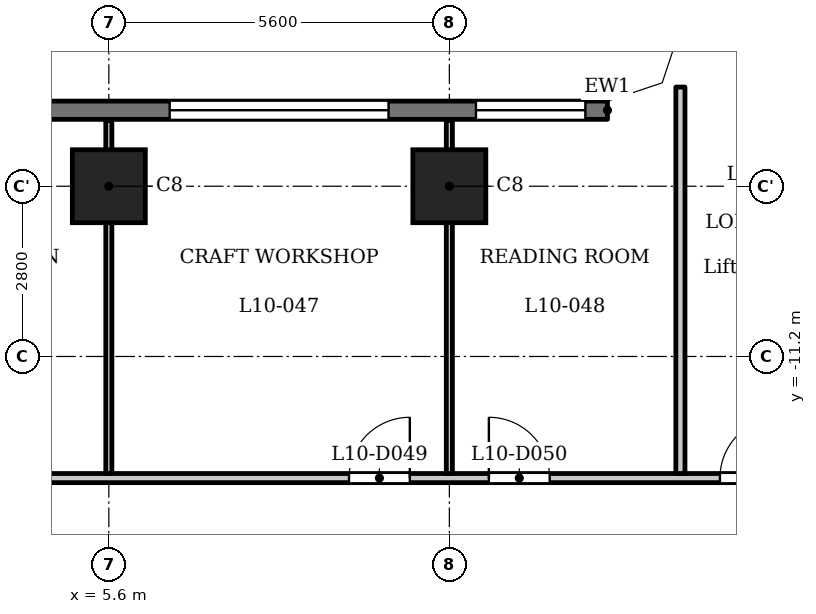
"""IFC4 building model, lengths in metres.
Left out: names, types, materials, properties, quantities, classifications, styles, units other than length and angle.
Written with IfcOpenShell. Run it as: python <this file> out.ifc"""

import sys

from ifc_helpers import new_model, si_unit, direction, frame, frame_2d, origin, origin_2d, place, context, subcontext, project, spatial, polyline, rectangle, outline, extrude, element, fill, save


model = new_model("IFC4")
c1 = context("Model", 3, precision=1e-05, world=origin(), true_north=direction((0.0, 1.0)))
c2 = subcontext(c1, "Body", "Model", "MODEL_VIEW")
j1 = project(units=[si_unit("LENGTHUNIT", "METRE"), si_unit("PLANEANGLEUNIT", "RADIAN")], contexts=[c1])
p1 = place(None, origin())
s1 = spatial("IfcSite", under=j1, at=p1, CompositionType="ELEMENT")
p2 = place(p1, origin())
s2 = spatial("IfcBuilding", under=s1, at=p2, CompositionType="ELEMENT")
p3 = place(p2, frame((0.0, 0.0, 44.5)))
s3 = spatial("IfcBuildingStorey", under=s2, at=p3, CompositionType="ELEMENT", Elevation=44.5)
for number, where, z_axis, x_axis in (
    (1, (5.6, -8.4, 0.0), (0.0, 0.0, 1.0), (1.0, 0.0, 0.0)),
    (2, (11.2, -8.4, 0.0), (0.0, 0.0, 1.0), (1.0, 0.0, 0.0)),
):
    element("IfcColumn", number, at=place(p3, frame(where, z_axis=z_axis, x_axis=x_axis)), inside=s3, PredefinedType="COLUMN", context=c2, shape_type="SweptSolid", body=[
        extrude(rectangle(XDim=1.2, YDim=1.2, at=origin_2d()), origin(), (0.0, 0.0, 1.0), 3.5),
    ])
p4 = place(p3, frame((13.8, -7.15, 0.0), z_axis=(0.0, 0.0, 1.0), x_axis=(-1.0, 0.0, 0.0)))
e3 = element("IfcWall", 3, at=p4, inside=s3, PredefinedType="SOLIDWALL", context=c2, shape_type="SweptSolid", body=[
    extrude(rectangle(XDim=27.6, YDim=0.3, at=frame_2d((13.8, 0.0))), origin(), (0.0, 0.0, 1.0), 3.2),
])
p5 = place(p4, frame((0.363, 0.0, 0.9)))
e4 = element("IfcOpeningElement", 4, at=p5, cuts=e3, PredefinedType="OPENING", context=c2, shape_type="SweptSolid", body=[
    extrude(rectangle(XDim=1.8, YDim=1.25, at=frame_2d((0.9, 0.625))), frame((0.0, 0.16, 0.0), z_axis=(0.0, -1.0, 0.0), x_axis=(1.0, 0.0, 0.0)), (0.0, 0.0, 1.0), 0.32),
])
p6 = place(p4, frame((3.6, 0.0, 1.2)))
e5 = element("IfcOpeningElement", 5, at=p6, cuts=e3, PredefinedType="OPENING", context=c2, shape_type="SweptSolid", body=[
    extrude(rectangle(XDim=3.6, YDim=0.95, at=frame_2d((1.8, 0.475))), frame((0.0, 0.16, 0.0), z_axis=(0.0, -1.0, 0.0), x_axis=(1.0, 0.0, 0.0)), (0.0, 0.0, 1.0), 0.32),
])
p7 = place(p4, frame((9.2, 0.0, 1.2)))
e6 = element("IfcOpeningElement", 6, at=p7, cuts=e3, PredefinedType="OPENING", context=c2, shape_type="SweptSolid", body=[
    extrude(rectangle(XDim=3.6, YDim=0.95, at=frame_2d((1.8, 0.475))), frame((0.0, 0.16, 0.0), z_axis=(0.0, -1.0, 0.0), x_axis=(1.0, 0.0, 0.0)), (0.0, 0.0, 1.0), 0.32),
])
p8 = place(p4, frame((14.8, 0.0, 1.2)))
e7 = element("IfcOpeningElement", 7, at=p8, cuts=e3, PredefinedType="OPENING", context=c2, shape_type="SweptSolid", body=[
    extrude(rectangle(XDim=3.6, YDim=0.95, at=frame_2d((1.8, 0.475))), frame((0.0, 0.16, 0.0), z_axis=(0.0, -1.0, 0.0), x_axis=(1.0, 0.0, 0.0)), (0.0, 0.0, 1.0), 0.32),
])
p9 = place(p4, frame((20.4, 0.0, 1.2)))
e8 = element("IfcOpeningElement", 8, at=p9, cuts=e3, PredefinedType="OPENING", context=c2, shape_type="SweptSolid", body=[
    extrude(rectangle(XDim=3.6, YDim=0.95, at=frame_2d((1.8, 0.475))), frame((0.0, 0.16, 0.0), z_axis=(0.0, -1.0, 0.0), x_axis=(1.0, 0.0, 0.0)), (0.0, 0.0, 1.0), 0.32),
])
p10 = place(p4, frame((25.438, 0.0, 0.9)))
e9 = element("IfcOpeningElement", 9, at=p10, cuts=e3, PredefinedType="OPENING", context=c2, shape_type="SweptSolid", body=[
    extrude(rectangle(XDim=1.8, YDim=1.25, at=frame_2d((0.9, 0.625))), frame((0.0, 0.16, 0.0), z_axis=(0.0, -1.0, 0.0), x_axis=(1.0, 0.0, 0.0)), (0.0, 0.0, 1.0), 0.32),
])
p11 = place(p3, frame((-17.4, -13.2, 0.0), z_axis=(0.0, 0.0, 1.0), x_axis=(1.0, 0.0, 0.0)))
e10 = element("IfcWall", 10, at=p11, inside=s3, PredefinedType="PARTITIONING", context=c2, shape_type="SweptSolid", body=[
    extrude(rectangle(XDim=34.8, YDim=0.15, at=frame_2d((17.4, 0.0))), origin(), (0.0, 0.0, 1.0), 3.2),
])
p12 = place(p11, frame((0.65, 0.0, 0.0)))
e11 = element("IfcOpeningElement", 11, at=p12, cuts=e10, PredefinedType="OPENING", context=c2, shape_type="SweptSolid", body=[
    extrude(rectangle(XDim=1.0, YDim=2.1, at=frame_2d((0.5, 1.05))), frame((0.0, 0.085, 0.0), z_axis=(0.0, -1.0, 0.0), x_axis=(1.0, 0.0, 0.0)), (0.0, 0.0, 1.0), 0.17),
])
p13 = place(p11, frame((33.05, 0.0, 0.0)))
e12 = element("IfcOpeningElement", 12, at=p13, cuts=e10, PredefinedType="OPENING", context=c2, shape_type="SweptSolid", body=[
    extrude(rectangle(XDim=1.0, YDim=2.1, at=frame_2d((0.5, 1.05))), frame((0.0, 0.085, 0.0), z_axis=(0.0, -1.0, 0.0), x_axis=(1.0, 0.0, 0.0)), (0.0, 0.0, 1.0), 0.17),
])
p14 = place(p11, frame((4.55, 0.0, 0.0)))
e13 = element("IfcOpeningElement", 13, at=p14, cuts=e10, PredefinedType="OPENING", context=c2, shape_type="SweptSolid", body=[
    extrude(rectangle(XDim=1.0, YDim=2.1, at=frame_2d((0.5, 1.05))), frame((0.0, 0.085, 0.0), z_axis=(0.0, -1.0, 0.0), x_axis=(1.0, 0.0, 0.0)), (0.0, 0.0, 1.0), 0.17),
])
p15 = place(p11, frame((6.9, 0.0, 0.0)))
e14 = element("IfcOpeningElement", 14, at=p15, cuts=e10, PredefinedType="OPENING", context=c2, shape_type="SweptSolid", body=[
    extrude(rectangle(XDim=1.0, YDim=2.1, at=frame_2d((0.5, 1.05))), frame((0.0, 0.085, 0.0), z_axis=(0.0, -1.0, 0.0), x_axis=(1.0, 0.0, 0.0)), (0.0, 0.0, 1.0), 0.17),
])
p16 = place(p11, frame((15.75, 0.0, 0.0)))
e15 = element("IfcOpeningElement", 15, at=p16, cuts=e10, PredefinedType="OPENING", context=c2, shape_type="SweptSolid", body=[
    extrude(rectangle(XDim=1.0, YDim=2.1, at=frame_2d((0.5, 1.05))), frame((0.0, 0.085, 0.0), z_axis=(0.0, -1.0, 0.0), x_axis=(1.0, 0.0, 0.0)), (0.0, 0.0, 1.0), 0.17),
])
p17 = place(p11, frame((18.1, 0.0, 0.0)))
e16 = element("IfcOpeningElement", 16, at=p17, cuts=e10, PredefinedType="OPENING", context=c2, shape_type="SweptSolid", body=[
    extrude(rectangle(XDim=1.0, YDim=2.1, at=frame_2d((0.5, 1.05))), frame((0.0, 0.085, 0.0), z_axis=(0.0, -1.0, 0.0), x_axis=(1.0, 0.0, 0.0)), (0.0, 0.0, 1.0), 0.17),
])
p18 = place(p11, frame((26.95, 0.0, 0.0)))
e17 = element("IfcOpeningElement", 17, at=p18, cuts=e10, PredefinedType="OPENING", context=c2, shape_type="SweptSolid", body=[
    extrude(rectangle(XDim=1.0, YDim=2.1, at=frame_2d((0.5, 1.05))), frame((0.0, 0.085, 0.0), z_axis=(0.0, -1.0, 0.0), x_axis=(1.0, 0.0, 0.0)), (0.0, 0.0, 1.0), 0.17),
])
p19 = place(p11, frame((29.25, 0.0, 0.0)))
e18 = element("IfcOpeningElement", 18, at=p19, cuts=e10, PredefinedType="OPENING", context=c2, shape_type="SweptSolid", body=[
    extrude(rectangle(XDim=1.0, YDim=2.1, at=frame_2d((0.5, 1.05))), frame((0.0, 0.085, 0.0), z_axis=(0.0, -1.0, 0.0), x_axis=(1.0, 0.0, 0.0)), (0.0, 0.0, 1.0), 0.17),
])
for number, where, z_axis, x_axis in (
    (19, (5.6, -13.125, 0.0), (0.0, 0.0, 1.0), (0.0, 1.0, 0.0)),
    (20, (11.2, -13.125, 0.0), (0.0, 0.0, 1.0), (0.0, 1.0, 0.0)),
):
    element("IfcWall", number, at=place(p3, frame(where, z_axis=z_axis, x_axis=x_axis)), inside=s3, PredefinedType="PARTITIONING", context=c2, shape_type="SweptSolid", body=[
        extrude(rectangle(XDim=5.805, YDim=0.1, at=frame_2d((2.902, 0.0))), origin(), (0.0, 0.0, 1.0), 3.2),
    ])
p20 = place(p3, frame((15.0, -13.125, 0.0), z_axis=(0.0, 0.0, 1.0), x_axis=(0.0, 1.0, 0.0)))
e21 = element("IfcWall", 21, at=p20, inside=s3, PredefinedType="PARTITIONING", context=c2, shape_type="SweptSolid", body=[
    extrude(rectangle(XDim=6.356, YDim=0.15, at=frame_2d((3.178, 0.0))), origin(), (0.0, 0.0, 1.0), 3.2),
])
p21 = place(p3, origin())
e22 = element("IfcWall", 22, at=p21, inside=s3, PredefinedType="SOLIDWALL", context=c2, shape_type="SweptSolid", body=[
    extrude(outline(polyline([(14.937, -6.937), (15.3, -5.849), (15.3, -5.8), (15.0, -5.8), (14.7, -6.7), (13.8, -7.0), (13.8, -7.3), (13.849, -7.3), (14.937, -6.937)])), origin(), (0.0, 0.0, 1.0), 3.2),
])
p22 = place(p13, origin())
e23 = element("IfcDoor", 23, at=p22, inside=s3, OperationType="SINGLE_SWING_LEFT", PredefinedType="DOOR", context=c2, shape_type="SweptSolid", body=[
    extrude(rectangle(XDim=1.0, YDim=2.1, at=frame_2d((0.5, 1.05))), frame((0.0, 0.025, 0.0), z_axis=(0.0, -1.0, 0.0), x_axis=(1.0, 0.0, 0.0)), (0.0, 0.0, 1.0), 0.05),
])
fill(e12, e23)
p23 = place(p18, origin())
e24 = element("IfcDoor", 24, at=p23, inside=s3, OperationType="SINGLE_SWING_LEFT", PredefinedType="DOOR", context=c2, shape_type="SweptSolid", body=[
    extrude(rectangle(XDim=1.0, YDim=2.1, at=frame_2d((0.5, 1.05))), frame((0.0, 0.025, 0.0), z_axis=(0.0, -1.0, 0.0), x_axis=(1.0, 0.0, 0.0)), (0.0, 0.0, 1.0), 0.05),
])
fill(e17, e24)
p24 = place(p19, origin())
e25 = element("IfcDoor", 25, at=p24, inside=s3, OperationType="SINGLE_SWING_RIGHT", PredefinedType="DOOR", context=c2, shape_type="SweptSolid", body=[
    extrude(rectangle(XDim=1.0, YDim=2.1, at=frame_2d((0.5, 1.05))), frame((0.0, 0.025, 0.0), z_axis=(0.0, -1.0, 0.0), x_axis=(1.0, 0.0, 0.0)), (0.0, 0.0, 1.0), 0.05),
])
fill(e18, e25)
p25 = place(p5, origin())
e26 = element("IfcWindow", 26, at=p25, inside=s3, PartitioningType="SINGLE_PANEL", PredefinedType="WINDOW", context=c2, shape_type="SweptSolid", body=[
    extrude(rectangle(XDim=1.8, YDim=1.25, at=frame_2d((0.9, 0.625))), frame((0.0, 0.03, 0.0), z_axis=(0.0, -1.0, 0.0), x_axis=(1.0, 0.0, 0.0)), (0.0, 0.0, 1.0), 0.06),
])
fill(e4, e26)
p26 = place(p6, origin())
e27 = element("IfcWindow", 27, at=p26, inside=s3, PartitioningType="SINGLE_PANEL", PredefinedType="WINDOW", context=c2, shape_type="SweptSolid", body=[
    extrude(rectangle(XDim=3.6, YDim=0.95, at=frame_2d((1.8, 0.475))), frame((0.0, 0.03, 0.0), z_axis=(0.0, -1.0, 0.0), x_axis=(1.0, 0.0, 0.0)), (0.0, 0.0, 1.0), 0.06),
])
fill(e5, e27)
save(model, sys.argv[1])
